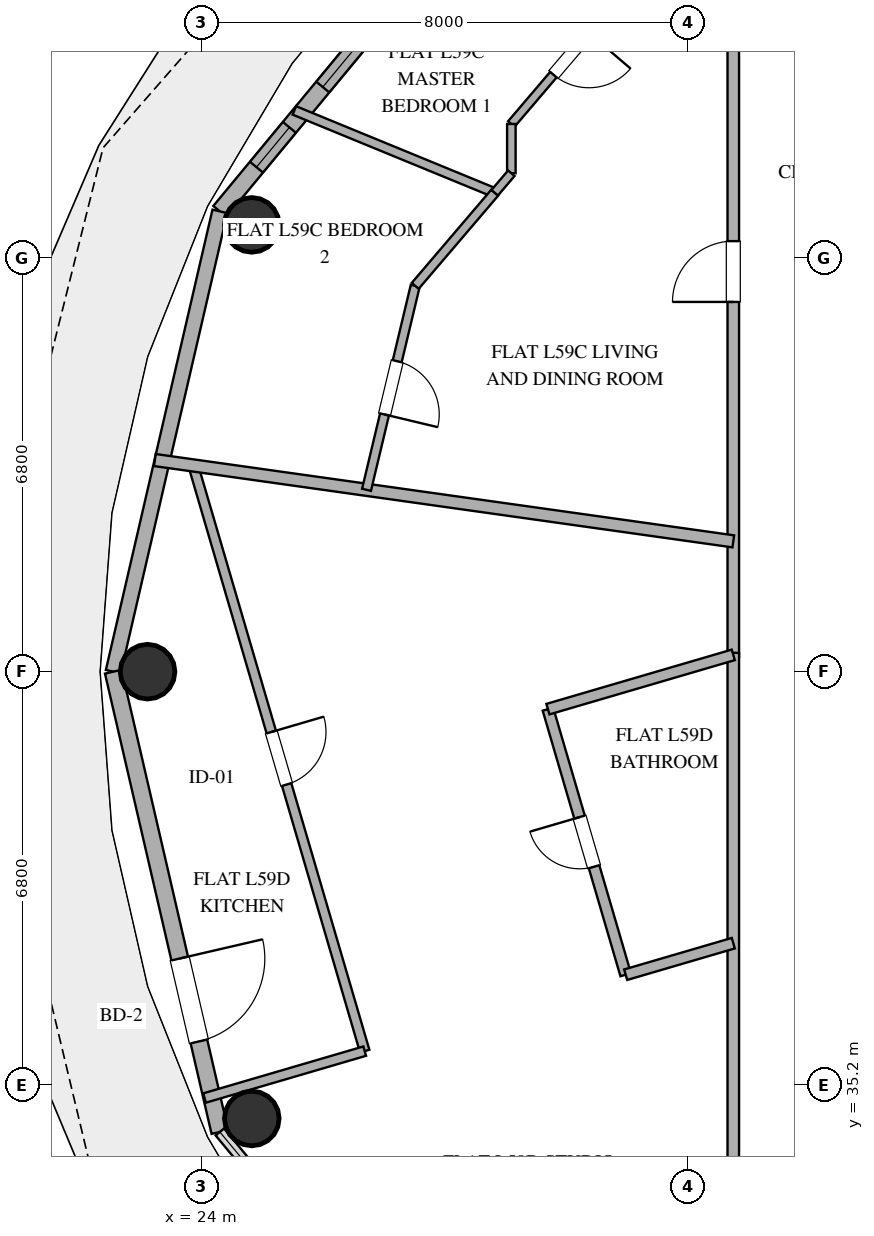
"""IFC4 building model, lengths in metres.
Left out: names, types, materials, properties, quantities, classifications, styles, units other than length and angle.
Written with IfcOpenShell. Run it as: python <this file> out.ifc"""

import sys

from ifc_helpers import new_model, si_unit, direction, frame, frame_2d, origin, origin_2d, place, context, subcontext, project, spatial, rectangle, hollow_circle, extrude, element, fill, save


model = new_model("IFC4")
c1 = context("Model", 3, precision=1e-05, world=origin(), true_north=direction((0.0, 1.0)))
c2 = subcontext(c1, "Body", "Model", "MODEL_VIEW")
j1 = project(units=[si_unit("LENGTHUNIT", "METRE"), si_unit("PLANEANGLEUNIT", "RADIAN")], contexts=[c1])
p1 = place(None, origin())
s1 = spatial("IfcSite", under=j1, at=p1, CompositionType="ELEMENT")
p2 = place(p1, origin())
s2 = spatial("IfcBuilding", under=s1, at=p2, CompositionType="ELEMENT")
p3 = place(p2, frame((0.0, 0.0, 231.6)))
s3 = spatial("IfcBuildingStorey", under=s2, at=p3, CompositionType="ELEMENT", Elevation=231.6)
for number, where, z_axis, x_axis in (
    (1, (24.831, 49.347, 0.0), (0.0, 0.0, 1.0), (1.0, 0.0, 0.0)),
    (2, (23.117, 42.0, 0.0), (0.0, 0.0, 1.0), (1.0, 0.0, 0.0)),
    (3, (24.831, 34.653, 0.0), (0.0, 0.0, 1.0), (1.0, 0.0, 0.0)),
):
    element("IfcColumn", number, at=place(p3, frame(where, z_axis=z_axis, x_axis=x_axis)), inside=s3, PredefinedType="COLUMN", context=c2, shape_type="SweptSolid", body=[
        extrude(hollow_circle(Radius=0.45, WallThickness=0.025, at=origin_2d()), origin(), (0.0, 0.0, 1.0), 3.36),
    ])
p4 = place(p3, frame((29.617, 55.987, 0.0), z_axis=(0.0, 0.0, 1.0), x_axis=(-0.63761509934, -0.770355103243, 0.0)))
e4 = element("IfcWall", 4, at=p4, inside=s3, PredefinedType="SOLIDWALL", context=c2, shape_type="SweptSolid", body=[
    extrude(rectangle(XDim=8.33, YDim=0.28, at=frame_2d((4.165, 0.0))), origin(), (0.0, 0.0, 1.0), 3.36),
])
p5 = place(p4, frame((2.031, 0.0, 0.85)))
e5 = element("IfcOpeningElement", 5, at=p5, cuts=e4, PredefinedType="OPENING", context=c2, shape_type="SweptSolid", body=[
    extrude(rectangle(XDim=1.65, YDim=2.0, at=frame_2d((0.825, 1.0))), frame((0.0, 0.15, 0.0), z_axis=(0.0, -1.0, 0.0), x_axis=(1.0, 0.0, 0.0)), (0.0, 0.0, 1.0), 0.3),
])
p6 = place(p4, frame((4.025, 0.0, 0.85)))
e6 = element("IfcOpeningElement", 6, at=p6, cuts=e4, PredefinedType="OPENING", context=c2, shape_type="SweptSolid", body=[
    extrude(rectangle(XDim=1.65, YDim=2.0, at=frame_2d((0.825, 1.0))), frame((0.0, 0.15, 0.0), z_axis=(0.0, -1.0, 0.0), x_axis=(1.0, 0.0, 0.0)), (0.0, 0.0, 1.0), 0.3),
])
p7 = place(p4, frame((6.536, 0.0, 0.85)))
e7 = element("IfcOpeningElement", 7, at=p7, cuts=e4, PredefinedType="OPENING", context=c2, shape_type="SweptSolid", body=[
    extrude(rectangle(XDim=0.85, YDim=1.8, at=frame_2d((0.425, 0.9))), frame((0.0, 0.15, 0.0), z_axis=(0.0, -1.0, 0.0), x_axis=(1.0, 0.0, 0.0)), (0.0, 0.0, 1.0), 0.3),
])
p8 = place(p3, frame((24.306, 49.57, 0.0), z_axis=(0.0, 0.0, 1.0), x_axis=(-0.225635078214, -0.974211892495, 0.0)))
e8 = element("IfcWall", 8, at=p8, inside=s3, PredefinedType="SOLIDWALL", context=c2, shape_type="SweptSolid", body=[
    extrude(rectangle(XDim=7.77, YDim=0.25, at=frame_2d((3.885, 0.0))), origin(), (0.0, 0.0, 1.0), 3.36),
])
p9 = place(p3, frame((22.553, 42.0, 0.0), z_axis=(0.0, 0.0, 1.0), x_axis=(0.225635078214, -0.974211892495, 0.0)))
e9 = element("IfcWall", 9, at=p9, inside=s3, PredefinedType="SOLIDWALL", context=c2, shape_type="SweptSolid", body=[
    extrude(rectangle(XDim=7.77, YDim=0.28, at=frame_2d((3.885, 0.0))), origin(), (0.0, 0.0, 1.0), 3.36),
])
p10 = place(p9, frame((4.842, 0.0, 0.0)))
e10 = element("IfcOpeningElement", 10, at=p10, cuts=e9, PredefinedType="OPENING", context=c2, shape_type="SweptSolid", body=[
    extrude(rectangle(XDim=1.4, YDim=2.2, at=frame_2d((0.7, 1.1))), frame((0.0, 0.15, 0.0), z_axis=(0.0, -1.0, 0.0), x_axis=(1.0, 0.0, 0.0)), (0.0, 0.0, 1.0), 0.3),
])
p11 = place(p3, frame((23.868, 45.392, 0.0), z_axis=(0.0, 0.0, 1.0), x_axis=(0.281018983641, -0.959702209455, 0.0)))
e11 = element("IfcWall", 11, at=p11, inside=s3, PredefinedType="PLUMBINGWALL", context=c2, shape_type="SweptSolid", body=[
    extrude(rectangle(XDim=10.036, YDim=0.16, at=frame_2d((5.018, 0.0))), origin(), (0.0, 0.0, 1.0), 2.72),
])
p12 = place(p11, frame((4.568, 0.0, 0.0)))
e12 = element("IfcOpeningElement", 12, at=p12, cuts=e11, PredefinedType="OPENING", context=c2, shape_type="SweptSolid", body=[
    extrude(rectangle(XDim=0.9, YDim=2.1, at=frame_2d((0.45, 1.05))), frame((0.0, 0.09, 0.0), z_axis=(0.0, -1.0, 0.0), x_axis=(1.0, 0.0, 0.0)), (0.0, 0.0, 1.0), 0.18),
])
p13 = place(p3, frame((32.75, 42.243, 0.0), z_axis=(0.0, 0.0, 1.0), x_axis=(0.0, 1.0, 0.0)))
e13 = element("IfcWall", 13, at=p13, inside=s3, PredefinedType="PARTITIONING", context=c2, shape_type="SweptSolid", body=[
    extrude(rectangle(XDim=10.807, YDim=0.19, at=frame_2d((5.404, 0.0))), origin(), (0.0, 0.0, 1.0), 2.72),
])
p14 = place(p13, frame((5.837, 0.0, 0.0)))
e14 = element("IfcOpeningElement", 14, at=p14, cuts=e13, PredefinedType="OPENING", context=c2, shape_type="SweptSolid", body=[
    extrude(rectangle(XDim=1.0, YDim=2.2, at=frame_2d((0.5, 1.1))), frame((0.0, 0.105, 0.0), z_axis=(0.0, -1.0, 0.0), x_axis=(1.0, 0.0, 0.0)), (0.0, 0.0, 1.0), 0.21),
])
p15 = place(p3, frame((32.75, 30.95, 0.0), z_axis=(0.0, 0.0, 1.0), x_axis=(0.0, 1.0, 0.0)))
e15 = element("IfcWall", 15, at=p15, inside=s3, PredefinedType="PARTITIONING", context=c2, shape_type="SweptSolid", body=[
    extrude(rectangle(XDim=11.36, YDim=0.19, at=frame_2d((5.68, 0.0))), origin(), (0.0, 0.0, 1.0), 2.72),
])
p16 = place(p3, frame((23.237, 45.48, 0.0), z_axis=(0.0, 0.0, 1.0), x_axis=(0.990269661234, -0.139161769316, 0.0)))
e16 = element("IfcWall", 16, at=p16, inside=s3, PredefinedType="PARTITIONING", context=c2, shape_type="SweptSolid", body=[
    extrude(rectangle(XDim=9.607, YDim=0.2, at=frame_2d((4.803, 0.0))), origin(), (0.0, 0.0, 1.0), 2.72),
])
p17 = place(p3, frame((30.98, 37.017, 0.0), z_axis=(0.0, 0.0, 1.0), x_axis=(-0.281021691617, 0.959701416504, 0.0)))
e17 = element("IfcWall", 17, at=p17, inside=s3, PredefinedType="PLUMBINGWALL", context=c2, shape_type="SweptSolid", body=[
    extrude(rectangle(XDim=4.551, YDim=0.18, at=frame_2d((2.275, 0.0))), origin(), (0.0, 0.0, 1.0), 2.72),
])
p18 = place(p17, frame((1.85, 0.0, 0.0)))
e18 = element("IfcOpeningElement", 18, at=p18, cuts=e17, PredefinedType="OPENING", context=c2, shape_type="SweptSolid", body=[
    extrude(rectangle(XDim=0.85, YDim=2.1, at=frame_2d((0.425, 1.05))), frame((0.0, 0.1, 0.0), z_axis=(0.0, -1.0, 0.0), x_axis=(1.0, 0.0, 0.0)), (0.0, 0.0, 1.0), 0.2),
])
p19 = place(p3, frame((25.531, 51.229, 0.0), z_axis=(0.0, 0.0, 1.0), x_axis=(0.925009924445, -0.37994294266, 0.0)))
e19 = element("IfcWall", 19, at=p19, inside=s3, PredefinedType="PARTITIONING", context=c2, shape_type="SweptSolid", body=[
    extrude(rectangle(XDim=3.562, YDim=0.15, at=frame_2d((1.781, 0.0))), origin(), (0.0, 0.0, 1.0), 2.72),
])
p20 = place(p3, frame((27.519, 48.345, 0.0), z_axis=(0.0, 0.0, 1.0), x_axis=(-0.232293676314, -0.97264569497, 0.0)))
e20 = element("IfcWall", 20, at=p20, inside=s3, PredefinedType="PARTITIONING", context=c2, shape_type="SweptSolid", body=[
    extrude(rectangle(XDim=3.448, YDim=0.15, at=frame_2d((1.724, 0.0))), origin(), (0.0, 0.0, 1.0), 2.72),
])
p21 = place(p20, frame((1.274, 0.0, 0.0)))
e21 = element("IfcOpeningElement", 21, at=p21, cuts=e20, PredefinedType="OPENING", context=c2, shape_type="SweptSolid", body=[
    extrude(rectangle(XDim=0.9, YDim=2.1, at=frame_2d((0.45, 1.05))), frame((0.0, 0.085, 0.0), z_axis=(0.0, -1.0, 0.0), x_axis=(1.0, 0.0, 0.0)), (0.0, 0.0, 1.0), 0.17),
])
p22 = place(p3, frame((29.702, 41.384, 0.0), z_axis=(0.0, 0.0, 1.0), x_axis=(0.959705055225, 0.281009264929, 0.0)))
e22 = element("IfcWall", 22, at=p22, inside=s3, PredefinedType="PLUMBINGWALL", context=c2, shape_type="SweptSolid", body=[
    extrude(rectangle(XDim=3.176, YDim=0.18, at=frame_2d((1.588, 0.0))), origin(), (0.0, 0.0, 1.0), 2.72),
])
p23 = place(p3, frame((31.689, 54.042, 0.0), z_axis=(0.0, 0.0, 1.0), x_axis=(-0.648985159088, -0.760801066826, 0.0)))
e23 = element("IfcWall", 23, at=p23, inside=s3, PredefinedType="PARTITIONING", context=c2, shape_type="SweptSolid", body=[
    extrude(rectangle(XDim=3.989, YDim=0.14, at=frame_2d((1.995, 0.0))), origin(), (0.0, 0.0, 1.0), 2.72),
])
p24 = place(p23, frame((2.023, 0.0, 0.0)))
e24 = element("IfcOpeningElement", 24, at=p24, cuts=e23, PredefinedType="OPENING", context=c2, shape_type="SweptSolid", body=[
    extrude(rectangle(XDim=0.9, YDim=2.1, at=frame_2d((0.45, 1.05))), frame((0.0, 0.08, 0.0), z_axis=(0.0, -1.0, 0.0), x_axis=(1.0, 0.0, 0.0)), (0.0, 0.0, 1.0), 0.16),
])
p25 = place(p3, frame((26.688, 35.76, 0.0), z_axis=(0.0, 0.0, 1.0), x_axis=(-0.959690607454, -0.281058602368, 0.0)))
e25 = element("IfcWall", 25, at=p25, inside=s3, PredefinedType="PLUMBINGWALL", context=c2, shape_type="SweptSolid", body=[
    extrude(rectangle(XDim=2.745, YDim=0.16, at=frame_2d((1.373, 0.0))), origin(), (0.0, 0.0, 1.0), 2.72),
])
p26 = place(p3, frame((28.826, 49.876, 0.0), z_axis=(0.0, 0.0, 1.0), x_axis=(-0.649252114502, -0.760573265251, 0.0)))
e26 = element("IfcWall", 26, at=p26, inside=s3, PredefinedType="PARTITIONING", context=c2, shape_type="SweptSolid", body=[
    extrude(rectangle(XDim=2.013, YDim=0.15, at=frame_2d((1.007, 0.0))), origin(), (0.0, 0.0, 1.0), 2.72),
])
p27 = place(p3, frame((32.75, 37.535, 0.0), z_axis=(0.0, 0.0, 1.0), x_axis=(-0.959679055102, -0.281098045527, 0.0)))
e27 = element("IfcWall", 27, at=p27, inside=s3, PredefinedType="PLUMBINGWALL", context=c2, shape_type="SweptSolid", body=[
    extrude(rectangle(XDim=1.844, YDim=0.18, at=frame_2d((0.922, 0.0))), origin(), (0.0, 0.0, 1.0), 2.72),
])
p28 = place(p3, frame((29.1, 51.007, 0.0), z_axis=(0.0, 0.0, 1.0), x_axis=(0.0, -1.0, 0.0)))
e28 = element("IfcWall", 28, at=p28, inside=s3, PredefinedType="PARTITIONING", context=c2, shape_type="SweptSolid", body=[
    extrude(rectangle(XDim=0.81, YDim=0.14, at=frame_2d((0.405, 0.0))), origin(), (0.0, 0.0, 1.0), 2.72),
])
p29 = place(p3, frame((29.1, 50.197, 0.0), z_axis=(0.0, 0.0, 1.0), x_axis=(-0.649360360175, -0.760480849617, 0.0)))
e29 = element("IfcWall", 29, at=p29, inside=s3, PredefinedType="PARTITIONING", context=c2, shape_type="SweptSolid", body=[
    extrude(rectangle(XDim=0.422, YDim=0.14, at=frame_2d((0.211, 0.0))), origin(), (0.0, 0.0, 1.0), 2.72),
])
p30 = place(p6, origin())
e30 = element("IfcWindow", 30, at=p30, inside=s3, PartitioningType="SINGLE_PANEL", PredefinedType="WINDOW", context=c2, shape_type="SweptSolid", body=[
    extrude(rectangle(XDim=1.65, YDim=2.0, at=frame_2d((0.825, 1.0))), frame((0.0, 0.03, 0.0), z_axis=(0.0, -1.0, 0.0), x_axis=(1.0, 0.0, 0.0)), (0.0, 0.0, 1.0), 0.06),
])
fill(e6, e30)
p31 = place(p10, origin())
e31 = element("IfcDoor", 31, at=p31, inside=s3, OperationType="SINGLE_SWING_LEFT", PredefinedType="DOOR", context=c2, shape_type="SweptSolid", body=[
    extrude(rectangle(XDim=1.4, YDim=2.2, at=frame_2d((0.7, 1.1))), frame((0.0, 0.025, 0.0), z_axis=(0.0, -1.0, 0.0), x_axis=(1.0, 0.0, 0.0)), (0.0, 0.0, 1.0), 0.05),
])
fill(e10, e31)
p32 = place(p7, origin())
e32 = element("IfcWindow", 32, at=p32, inside=s3, PartitioningType="SINGLE_PANEL", PredefinedType="WINDOW", context=c2, shape_type="SweptSolid", body=[
    extrude(rectangle(XDim=0.85, YDim=1.8, at=frame_2d((0.425, 0.9))), frame((0.0, 0.03, 0.0), z_axis=(0.0, -1.0, 0.0), x_axis=(1.0, 0.0, 0.0)), (0.0, 0.0, 1.0), 0.06),
])
fill(e7, e32)
p33 = place(p12, origin())
e33 = element("IfcDoor", 33, at=p33, inside=s3, OperationType="SINGLE_SWING_LEFT", PredefinedType="DOOR", context=c2, shape_type="SweptSolid", body=[
    extrude(rectangle(XDim=0.9, YDim=2.1, at=frame_2d((0.45, 1.05))), frame((0.0, 0.025, 0.0), z_axis=(0.0, -1.0, 0.0), x_axis=(1.0, 0.0, 0.0)), (0.0, 0.0, 1.0), 0.05),
])
fill(e12, e33)
p34 = place(p14, origin())
e34 = element("IfcDoor", 34, at=p34, inside=s3, OperationType="SINGLE_SWING_LEFT", PredefinedType="DOOR", context=c2, shape_type="SweptSolid", body=[
    extrude(rectangle(XDim=1.0, YDim=2.2, at=frame_2d((0.5, 1.1))), frame((0.0, 0.025, 0.0), z_axis=(0.0, -1.0, 0.0), x_axis=(1.0, 0.0, 0.0)), (0.0, 0.0, 1.0), 0.05),
])
fill(e14, e34)
p35 = place(p18, origin())
e35 = element("IfcDoor", 35, at=p35, inside=s3, OperationType="SINGLE_SWING_RIGHT", PredefinedType="DOOR", context=c2, shape_type="SweptSolid", body=[
    extrude(rectangle(XDim=0.85, YDim=2.1, at=frame_2d((0.425, 1.05))), frame((0.0, 0.025, 0.0), z_axis=(0.0, -1.0, 0.0), x_axis=(1.0, 0.0, 0.0)), (0.0, 0.0, 1.0), 0.05),
])
fill(e18, e35)
p36 = place(p21, origin())
e36 = element("IfcDoor", 36, at=p36, inside=s3, OperationType="SINGLE_SWING_RIGHT", PredefinedType="DOOR", context=c2, shape_type="SweptSolid", body=[
    extrude(rectangle(XDim=0.9, YDim=2.1, at=frame_2d((0.45, 1.05))), frame((0.0, 0.025, 0.0), z_axis=(0.0, -1.0, 0.0), x_axis=(1.0, 0.0, 0.0)), (0.0, 0.0, 1.0), 0.05),
])
fill(e21, e36)
p37 = place(p24, origin())
e37 = element("IfcDoor", 37, at=p37, inside=s3, OperationType="SINGLE_SWING_LEFT", PredefinedType="DOOR", context=c2, shape_type="SweptSolid", body=[
    extrude(rectangle(XDim=0.9, YDim=2.1, at=frame_2d((0.45, 1.05))), frame((0.0, 0.025, 0.0), z_axis=(0.0, -1.0, 0.0), x_axis=(1.0, 0.0, 0.0)), (0.0, 0.0, 1.0), 0.05),
])
fill(e24, e37)
save(model, sys.argv[1])
